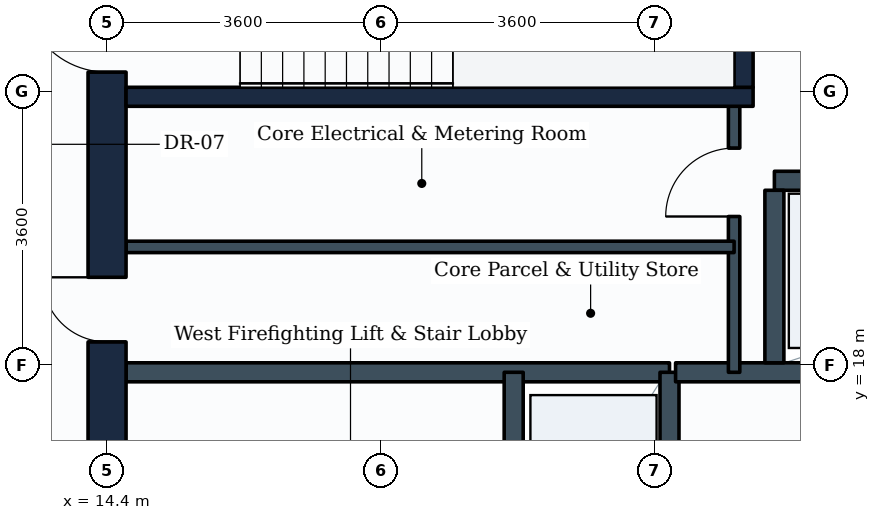
"""IFC4 building model, lengths in metres.
Left out: names, types, materials, properties, quantities, classifications, styles, units other than length and angle.
Written with IfcOpenShell. Run it as: python <this file> out.ifc"""

import sys

from ifc_helpers import new_model, si_unit, direction, frame, frame_2d, origin, place, context, subcontext, project, spatial, rectangle, extrude, element, fill, save


model = new_model("IFC4")
c1 = context("Model", 3, precision=1e-05, world=origin(), true_north=direction((0.0, 1.0)))
c2 = subcontext(c1, "Body", "Model", "MODEL_VIEW")
j1 = project(units=[si_unit("LENGTHUNIT", "METRE"), si_unit("PLANEANGLEUNIT", "RADIAN")], contexts=[c1])
p1 = place(None, origin())
s1 = spatial("IfcSite", under=j1, at=p1, CompositionType="ELEMENT")
p2 = place(p1, origin())
s2 = spatial("IfcBuilding", under=s1, at=p2, CompositionType="ELEMENT")
p3 = place(p2, frame((0.0, 0.0, 186.2)))
s3 = spatial("IfcBuildingStorey", under=s2, at=p3, CompositionType="ELEMENT", Elevation=186.2)
p4 = place(p3, frame((14.4, 10.8, 0.0), z_axis=(0.0, 0.0, 1.0), x_axis=(0.0, 1.0, 0.0)))
e1 = element("IfcWall", 1, at=p4, inside=s3, PredefinedType="SHEAR", context=c2, shape_type="SweptSolid", body=[
    extrude(rectangle(XDim=14.4, YDim=0.5, at=frame_2d((7.2, 0.0))), origin(), (0.0, 0.0, 1.0), 3.55),
])
p5 = place(p4, frame((11.05, 0.0, 0.0)))
e2 = element("IfcOpeningElement", 2, at=p5, cuts=e1, PredefinedType="OPENING", context=c2, shape_type="SweptSolid", body=[
    extrude(rectangle(XDim=1.1, YDim=2.1, at=frame_2d((0.55, 1.05))), frame((0.0, 0.26, 0.0), z_axis=(0.0, -1.0, 0.0), x_axis=(1.0, 0.0, 0.0)), (0.0, 0.0, 1.0), 0.52),
])
p6 = place(p4, frame((4.9, 0.0, 0.0)))
e3 = element("IfcOpeningElement", 3, at=p6, cuts=e1, PredefinedType="OPENING", context=c2, shape_type="SweptSolid", body=[
    extrude(rectangle(XDim=1.2, YDim=2.1, at=frame_2d((0.6, 1.05))), frame((0.0, 0.26, 0.0), z_axis=(0.0, -1.0, 0.0), x_axis=(1.0, 0.0, 0.0)), (0.0, 0.0, 1.0), 0.52),
])
p7 = place(p4, frame((7.5, 0.0, 0.0)))
e4 = element("IfcOpeningElement", 4, at=p7, cuts=e1, PredefinedType="OPENING", context=c2, shape_type="SweptSolid", body=[
    extrude(rectangle(XDim=0.85, YDim=2.1, at=frame_2d((0.425, 1.05))), frame((0.0, 0.26, 0.0), z_axis=(0.0, -1.0, 0.0), x_axis=(1.0, 0.0, 0.0)), (0.0, 0.0, 1.0), 0.52),
])
p8 = place(p3, frame((14.65, 21.525, 0.0), z_axis=(0.0, 0.0, 1.0), x_axis=(1.0, 0.0, 0.0)))
e5 = element("IfcWall", 5, at=p8, inside=s3, PredefinedType="SHEAR", context=c2, shape_type="SweptSolid", body=[
    extrude(rectangle(XDim=8.25, YDim=0.25, at=frame_2d((4.125, 0.0))), origin(), (0.0, 0.0, 1.0), 3.55),
])
p9 = place(p3, frame((22.775, 21.65, 0.0), z_axis=(0.0, 0.0, 1.0), x_axis=(0.0, 1.0, 0.0)))
e6 = element("IfcWall", 6, at=p9, inside=s3, PredefinedType="SHEAR", context=c2, shape_type="SweptSolid", body=[
    extrude(rectangle(XDim=2.84, YDim=0.25, at=frame_2d((1.42, 0.0))), origin(), (0.0, 0.0, 1.0), 3.55),
])
p10 = place(p3, frame((14.65, 17.9, 0.0), z_axis=(0.0, 0.0, 1.0), x_axis=(1.0, 0.0, 0.0)))
e7 = element("IfcWall", 7, at=p10, inside=s3, PredefinedType="PARTITIONING", context=c2, shape_type="SweptSolid", body=[
    extrude(rectangle(XDim=7.15, YDim=0.25, at=frame_2d((3.575, 0.0))), origin(), (0.0, 0.0, 1.0), 3.535),
])
p11 = place(p3, frame((19.75, 14.84, 0.0), z_axis=(0.0, 0.0, 1.0), x_axis=(0.0, 1.0, 0.0)))
e8 = element("IfcWall", 8, at=p11, inside=s3, PredefinedType="PARTITIONING", context=c2, shape_type="SweptSolid", body=[
    extrude(rectangle(XDim=3.06, YDim=0.25, at=frame_2d((1.53, 0.0))), origin(), (0.0, 0.0, 1.0), 3.535),
])
p12 = place(p11, frame((0.98, 0.0, 0.0)))
e9 = element("IfcOpeningElement", 9, at=p12, cuts=e8, PredefinedType="OPENING", context=c2, shape_type="SweptSolid", body=[
    extrude(rectangle(XDim=1.1, YDim=2.1, at=frame_2d((0.55, 1.05))), frame((0.0, 0.135, 0.0), z_axis=(0.0, -1.0, 0.0), x_axis=(1.0, 0.0, 0.0)), (0.0, 0.0, 1.0), 0.27),
])
p13 = place(p3, frame((21.8, 14.84, 0.0), z_axis=(0.0, 0.0, 1.0), x_axis=(0.0, 1.0, 0.0)))
e10 = element("IfcWall", 10, at=p13, inside=s3, PredefinedType="PARTITIONING", context=c2, shape_type="SweptSolid", body=[
    extrude(rectangle(XDim=3.06, YDim=0.25, at=frame_2d((1.53, 0.0))), origin(), (0.0, 0.0, 1.0), 3.535),
])
p14 = place(p3, frame((21.88, 17.9, 0.0), z_axis=(0.0, 0.0, 1.0), x_axis=(1.0, 0.0, 0.0)))
e11 = element("IfcWall", 11, at=p14, inside=s3, PredefinedType="PARTITIONING", context=c2, shape_type="SweptSolid", body=[
    extrude(rectangle(XDim=8.52, YDim=0.25, at=frame_2d((4.26, 0.0))), origin(), (0.0, 0.0, 1.0), 3.535),
])
p15 = place(p3, frame((23.18, 20.42, 0.0), z_axis=(0.0, 0.0, 1.0), x_axis=(1.0, 0.0, 0.0)))
e12 = element("IfcWall", 12, at=p15, inside=s3, PredefinedType="PARTITIONING", context=c2, shape_type="SweptSolid", body=[
    extrude(rectangle(XDim=7.22, YDim=0.25, at=frame_2d((3.61, 0.0))), origin(), (0.0, 0.0, 1.0), 3.535),
])
p16 = place(p15, frame((0.41, 0.0, 0.0)))
e13 = element("IfcOpeningElement", 13, at=p16, cuts=e12, PredefinedType="OPENING", context=c2, shape_type="SweptSolid", body=[
    extrude(rectangle(XDim=1.1, YDim=2.1, at=frame_2d((0.55, 1.05))), frame((0.0, 0.135, 0.0), z_axis=(0.0, -1.0, 0.0), x_axis=(1.0, 0.0, 0.0)), (0.0, 0.0, 1.0), 0.27),
])
p17 = place(p15, frame((2.19, 0.0, 0.0)))
e14 = element("IfcOpeningElement", 14, at=p17, cuts=e12, PredefinedType="OPENING", context=c2, shape_type="SweptSolid", body=[
    extrude(rectangle(XDim=1.1, YDim=2.1, at=frame_2d((0.55, 1.05))), frame((0.0, 0.135, 0.0), z_axis=(0.0, -1.0, 0.0), x_axis=(1.0, 0.0, 0.0)), (0.0, 0.0, 1.0), 0.27),
])
p18 = place(p15, frame((3.97, 0.0, 0.0)))
e15 = element("IfcOpeningElement", 15, at=p18, cuts=e12, PredefinedType="OPENING", context=c2, shape_type="SweptSolid", body=[
    extrude(rectangle(XDim=1.1, YDim=2.1, at=frame_2d((0.55, 1.05))), frame((0.0, 0.135, 0.0), z_axis=(0.0, -1.0, 0.0), x_axis=(1.0, 0.0, 0.0)), (0.0, 0.0, 1.0), 0.27),
])
p19 = place(p15, frame((5.75, 0.0, 0.0)))
e16 = element("IfcOpeningElement", 16, at=p19, cuts=e12, PredefinedType="OPENING", context=c2, shape_type="SweptSolid", body=[
    extrude(rectangle(XDim=1.1, YDim=2.1, at=frame_2d((0.55, 1.05))), frame((0.0, 0.135, 0.0), z_axis=(0.0, -1.0, 0.0), x_axis=(1.0, 0.0, 0.0)), (0.0, 0.0, 1.0), 0.27),
])
p20 = place(p3, frame((23.18, 18.025, 0.0), z_axis=(0.0, 0.0, 1.0), x_axis=(0.0, 1.0, 0.0)))
e17 = element("IfcWall", 17, at=p20, inside=s3, PredefinedType="PARTITIONING", context=c2, shape_type="SweptSolid", body=[
    extrude(rectangle(XDim=2.27, YDim=0.25, at=frame_2d((1.135, 0.0))), origin(), (0.0, 0.0, 1.0), 3.535),
])
p21 = place(p3, frame((22.65, 17.9, 0.0), z_axis=(0.0, 0.0, 1.0), x_axis=(0.0, 1.0, 0.0)))
e18 = element("IfcWall", 18, at=p21, inside=s3, PredefinedType="PARTITIONING", context=c2, shape_type="SweptSolid", body=[
    extrude(rectangle(XDim=3.625, YDim=0.15, at=frame_2d((1.812, 0.0))), origin(), (0.0, 0.0, 1.0), 3.535),
])
p22 = place(p21, frame((2.05, 0.0, 0.0)))
e19 = element("IfcOpeningElement", 19, at=p22, cuts=e18, PredefinedType="OPENING", context=c2, shape_type="SweptSolid", body=[
    extrude(rectangle(XDim=0.9, YDim=2.1, at=frame_2d((0.45, 1.05))), frame((0.0, 0.085, 0.0), z_axis=(0.0, -1.0, 0.0), x_axis=(1.0, 0.0, 0.0)), (0.0, 0.0, 1.0), 0.17),
])
p23 = place(p3, frame((14.65, 19.55, 0.0), z_axis=(0.0, 0.0, 1.0), x_axis=(1.0, 0.0, 0.0)))
e20 = element("IfcWall", 20, at=p23, inside=s3, PredefinedType="PARTITIONING", context=c2, shape_type="SweptSolid", body=[
    extrude(rectangle(XDim=8.0, YDim=0.15, at=frame_2d((4.0, 0.0))), origin(), (0.0, 0.0, 1.0), 3.535),
])
p24 = place(p5, origin())
e21 = element("IfcDoor", 21, at=p24, inside=s3, OperationType="SINGLE_SWING_RIGHT", PredefinedType="DOOR", context=c2, shape_type="SweptSolid", body=[
    extrude(rectangle(XDim=1.1, YDim=2.1, at=frame_2d((0.55, 1.05))), frame((0.0, 0.025, 0.0), z_axis=(0.0, -1.0, 0.0), x_axis=(1.0, 0.0, 0.0)), (0.0, 0.0, 1.0), 0.05),
])
fill(e2, e21)
p25 = place(p7, origin())
e22 = element("IfcDoor", 22, at=p25, inside=s3, OperationType="SINGLE_SWING_RIGHT", PredefinedType="DOOR", context=c2, shape_type="SweptSolid", body=[
    extrude(rectangle(XDim=0.85, YDim=2.1, at=frame_2d((0.425, 1.05))), frame((0.0, 0.025, 0.0), z_axis=(0.0, -1.0, 0.0), x_axis=(1.0, 0.0, 0.0)), (0.0, 0.0, 1.0), 0.05),
])
fill(e4, e22)
p26 = place(p22, origin())
e23 = element("IfcDoor", 23, at=p26, inside=s3, OperationType="SINGLE_SWING_LEFT", PredefinedType="DOOR", context=c2, shape_type="SweptSolid", body=[
    extrude(rectangle(XDim=0.9, YDim=2.1, at=frame_2d((0.45, 1.05))), frame((0.0, 0.025, 0.0), z_axis=(0.0, -1.0, 0.0), x_axis=(1.0, 0.0, 0.0)), (0.0, 0.0, 1.0), 0.05),
])
fill(e19, e23)
save(model, sys.argv[1])
